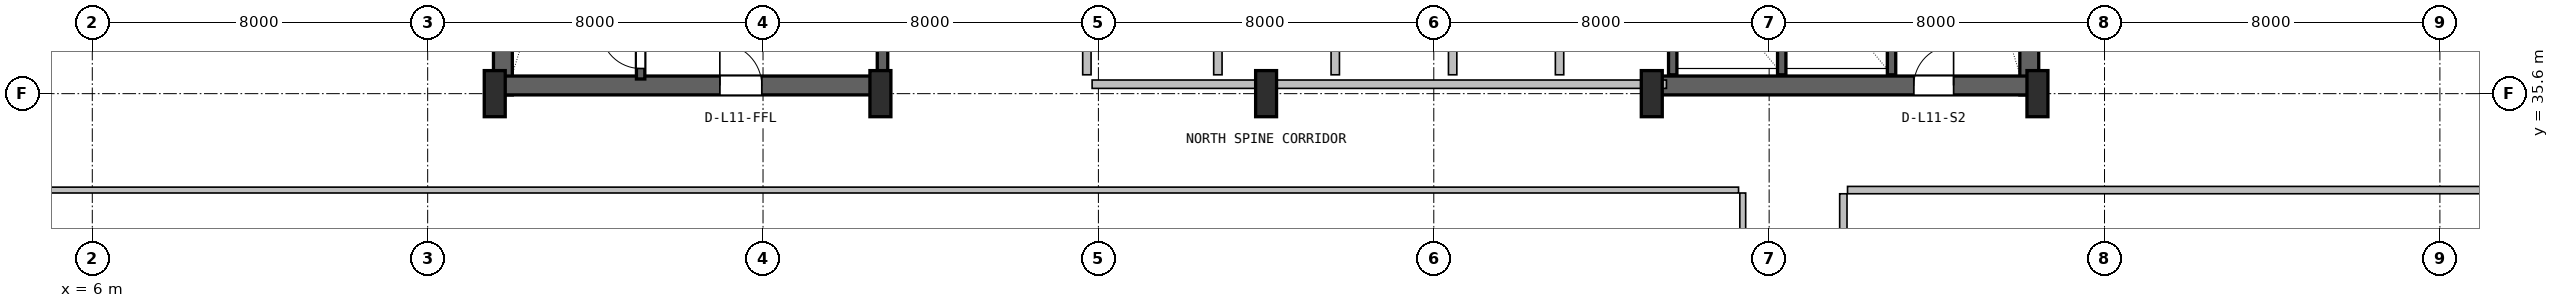
"""IFC4 building model, lengths in metres.
Left out: names, types, materials, properties, quantities, classifications, styles, units other than length and angle.
Written with IfcOpenShell. Run it as: python <this file> out.ifc"""

import sys

from ifc_helpers import new_model, si_unit, direction, frame, frame_2d, origin, origin_2d, place, context, subcontext, project, spatial, rectangle, i_section, extrude, source, transform, mapped, element, fill, save


model = new_model("IFC4")
c1 = context("Model", 3, precision=1e-05, world=origin(), true_north=direction((0.0, 1.0)))
c2 = subcontext(c1, "Body", "Model", "MODEL_VIEW")
j1 = project(units=[si_unit("LENGTHUNIT", "METRE"), si_unit("PLANEANGLEUNIT", "RADIAN")], contexts=[c1])
p1 = place(None, origin())
s1 = spatial("IfcSite", under=j1, at=p1, CompositionType="ELEMENT")
p2 = place(p1, origin())
s2 = spatial("IfcBuilding", under=s1, at=p2, CompositionType="ELEMENT")
p3 = place(p2, frame((0.0, 0.0, 51.0)))
s3 = spatial("IfcBuildingStorey", under=s2, at=p3, CompositionType="ELEMENT", Elevation=51.0)
for number, where, z_axis, x_axis in (
    (1, (15.795, 35.57, 0.0), (0.0, 0.0, 1.0), (0.0, 1.0, 0.0)),
    (2, (52.205, 35.57, 0.0), (0.0, 0.0, 1.0), (0.0, 1.0, 0.0)),
):
    element("IfcWall", number, at=place(p3, frame(where, z_axis=z_axis, x_axis=x_axis)), inside=s3, PredefinedType="SHEAR", context=c2, shape_type="SweptSolid", body=[
        extrude(rectangle(XDim=11.23, YDim=0.45, at=frame_2d((5.615, 0.0))), origin(), (0.0, 0.0, 1.0), 3.65),
    ])
p4 = place(p3, frame((15.57, 35.795, 0.0), z_axis=(0.0, 0.0, 1.0), x_axis=(1.0, 0.0, 0.0)))
e3 = element("IfcWall", 3, at=p4, inside=s3, PredefinedType="SHEAR", context=c2, shape_type="SweptSolid", body=[
    extrude(rectangle(XDim=9.23, YDim=0.45, at=frame_2d((4.615, 0.0))), origin(), (0.0, 0.0, 1.0), 3.65),
])
p5 = place(p4, frame((5.4, 0.0, 0.0)))
e4 = element("IfcOpeningElement", 4, at=p5, cuts=e3, PredefinedType="OPENING", context=c2, shape_type="SweptSolid", body=[
    extrude(rectangle(XDim=1.0, YDim=2.1, at=frame_2d((0.5, 1.05))), frame((0.0, 0.235, 0.0), z_axis=(0.0, -1.0, 0.0), x_axis=(1.0, 0.0, 0.0)), (0.0, 0.0, 1.0), 0.47),
])
p6 = place(p3, frame((43.2, 35.795, 0.0), z_axis=(0.0, 0.0, 1.0), x_axis=(1.0, 0.0, 0.0)))
e5 = element("IfcWall", 5, at=p6, inside=s3, PredefinedType="SHEAR", context=c2, shape_type="SweptSolid", body=[
    extrude(rectangle(XDim=9.23, YDim=0.45, at=frame_2d((4.615, 0.0))), origin(), (0.0, 0.0, 1.0), 3.65),
])
p7 = place(p6, frame((6.25, 0.0, 0.0)))
e6 = element("IfcOpeningElement", 6, at=p7, cuts=e5, PredefinedType="OPENING", context=c2, shape_type="SweptSolid", body=[
    extrude(rectangle(XDim=0.95, YDim=2.1, at=frame_2d((0.475, 1.05))), frame((0.0, 0.235, 0.0), z_axis=(0.0, -1.0, 0.0), x_axis=(1.0, 0.0, 0.0)), (0.0, 0.0, 1.0), 0.47),
])
m1 = source(origin(), c2, "Body", "SweptSolid", [
    extrude(i_section(OverallWidth=0.5, OverallDepth=1.1, WebThickness=0.018, FlangeThickness=0.032, FilletRadius=0.018, at=origin_2d()), origin(), (0.0, 0.0, 1.0), 3.9),
])
for number, where, z_axis, x_axis in (
    (7, (15.6, 35.6, 0.0), (0.0, 0.0, 1.0), (1.0, 0.0, 0.0)),
    (8, (24.8, 35.6, 0.0), (0.0, 0.0, 1.0), (1.0, 0.0, 0.0)),
    (9, (34.0, 35.6, 0.0), (0.0, 0.0, 1.0), (1.0, 0.0, 0.0)),
    (10, (43.2, 35.6, 0.0), (0.0, 0.0, 1.0), (1.0, 0.0, 0.0)),
    (11, (52.4, 35.6, 0.0), (0.0, 0.0, 1.0), (1.0, 0.0, 0.0)),
):
    element("IfcColumn", number, at=place(p3, frame(where, z_axis=z_axis, x_axis=x_axis)), inside=s3, PredefinedType="COLUMN", context=c2, shape_type="MappedRepresentation", body=[
        mapped(m1, transform((0.0, 0.0, 0.0), x_axis=(1.0, 0.0, 0.0), y_axis=(0.0, 1.0, 0.0), z_axis=(0.0, 0.0, 1.0), scale=1.0)),
    ])
p8 = place(p3, frame((19.08, 35.95, 0.0), z_axis=(0.0, 0.0, 1.0), x_axis=(0.0, 1.0, 0.0)))
e12 = element("IfcWall", 12, at=p8, inside=s3, PredefinedType="SHEAR", context=c2, shape_type="SweptSolid", body=[
    extrude(rectangle(XDim=9.65, YDim=0.2, at=frame_2d((4.825, 0.0))), origin(), (0.0, 0.0, 1.0), 3.65),
])
p9 = place(p8, frame((0.25, 0.0, 0.0)))
e13 = element("IfcOpeningElement", 13, at=p9, cuts=e12, PredefinedType="OPENING", context=c2, shape_type="SweptSolid", body=[
    extrude(rectangle(XDim=0.95, YDim=2.1, at=frame_2d((0.475, 1.05))), frame((0.0, 0.11, 0.0), z_axis=(0.0, -1.0, 0.0), x_axis=(1.0, 0.0, 0.0)), (0.0, 0.0, 1.0), 0.22),
])
p10 = place(p3, frame((24.85, 36.05, 0.0), z_axis=(0.0, 0.0, 1.0), x_axis=(0.0, 1.0, 0.0)))
e14 = element("IfcWall", 14, at=p10, inside=s3, PredefinedType="SHEAR", context=c2, shape_type="SweptSolid", body=[
    extrude(rectangle(XDim=10.45, YDim=0.25, at=frame_2d((5.225, 0.0))), origin(), (0.0, 0.0, 1.0), 3.65),
])
p11 = place(p3, frame((48.92, 36.05, 0.0), z_axis=(0.0, 0.0, 1.0), x_axis=(0.0, 1.0, 0.0)))
e15 = element("IfcWall", 15, at=p11, inside=s3, PredefinedType="SHEAR", context=c2, shape_type="SweptSolid", body=[
    extrude(rectangle(XDim=10.5, YDim=0.2, at=frame_2d((5.25, 0.0))), origin(), (0.0, 0.0, 1.0), 3.65),
])
for number, where, z_axis, x_axis in (
    (16, (43.7, 36.05, 0.0), (0.0, 0.0, 1.0), (0.0, 1.0, 0.0)),
    (17, (46.3, 36.05, 0.0), (0.0, 0.0, 1.0), (0.0, 1.0, 0.0)),
):
    element("IfcWall", number, at=place(p3, frame(where, z_axis=z_axis, x_axis=x_axis)), inside=s3, PredefinedType="SHEAR", context=c2, shape_type="SweptSolid", body=[
        extrude(rectangle(XDim=3.05, YDim=0.2, at=frame_2d((1.525, 0.0))), origin(), (0.0, 0.0, 1.0), 3.65),
    ])
p12 = place(p3, frame((29.85, 35.825, 0.0), z_axis=(0.0, 0.0, 1.0), x_axis=(1.0, 0.0, 0.0)))
e18 = element("IfcWall", 18, at=p12, inside=s3, PredefinedType="SOLIDWALL", context=c2, shape_type="SweptSolid", body=[
    extrude(rectangle(XDim=13.7, YDim=0.2, at=frame_2d((6.85, 0.0))), origin(), (0.0, 0.0, 1.0), 2.425),
])
for number, where, z_axis, x_axis in (
    (19, (32.85, 36.05, 0.0), (0.0, 0.0, 1.0), (0.0, 1.0, 0.0)),
    (20, (29.725, 36.05, 0.0), (0.0, 0.0, 1.0), (0.0, 1.0, 0.0)),
    (21, (35.65, 36.05, 0.0), (0.0, 0.0, 1.0), (0.0, 1.0, 0.0)),
    (22, (38.45, 36.05, 0.0), (0.0, 0.0, 1.0), (0.0, 1.0, 0.0)),
):
    element("IfcWall", number, at=place(p3, frame(where, z_axis=z_axis, x_axis=x_axis)), inside=s3, PredefinedType="PLUMBINGWALL", context=c2, shape_type="SweptSolid", body=[
        extrude(rectangle(XDim=3.1, YDim=0.2, at=frame_2d((1.55, 0.0))), origin(), (0.0, 0.0, 1.0), 3.63),
    ])
p13 = place(p3, frame((41.0, 36.05, 0.0), z_axis=(0.0, 0.0, 1.0), x_axis=(0.0, 1.0, 0.0)))
e23 = element("IfcWall", 23, at=p13, inside=s3, PredefinedType="SOLIDWALL", context=c2, shape_type="SweptSolid", body=[
    extrude(rectangle(XDim=3.1, YDim=0.2, at=frame_2d((1.55, 0.0))), origin(), (0.0, 0.0, 1.0), 3.63),
])
p14 = place(p3, frame((45.37, 23.6, 0.0), z_axis=(0.0, 0.0, 1.0), x_axis=(0.0, 1.0, 0.0)))
e24 = element("IfcWall", 24, at=p14, inside=s3, PredefinedType="PARTITIONING", context=c2, shape_type="SweptSolid", body=[
    extrude(rectangle(XDim=9.63, YDim=0.14, at=frame_2d((4.815, 0.0))), origin(), (0.0, 0.0, 1.0), 3.378),
])
p15 = place(p3, frame((2.18, 33.3, 0.0), z_axis=(0.0, 0.0, 1.0), x_axis=(1.0, 0.0, 0.0)))
e25 = element("IfcWall", 25, at=p15, inside=s3, PredefinedType="PARTITIONING", context=c2, shape_type="SweptSolid", body=[
    extrude(rectangle(XDim=43.09, YDim=0.14, at=frame_2d((21.545, 0.0))), origin(), (0.0, 0.0, 1.0), 2.852),
])
p16 = place(p3, frame((47.77, 2.55, 0.0), z_axis=(0.0, 0.0, 1.0), x_axis=(0.0, 1.0, 0.0)))
e26 = element("IfcWall", 26, at=p16, inside=s3, PredefinedType="PARTITIONING", context=c2, shape_type="SweptSolid", body=[
    extrude(rectangle(XDim=30.662, YDim=0.175, at=frame_2d((15.331, 0.0))), origin(), (0.0, 0.0, 1.0), 3.322),
])
p17 = place(p16, frame((5.515, 0.0, 0.0)))
e27 = element("IfcOpeningElement", 27, at=p17, cuts=e26, PredefinedType="OPENING", context=c2, shape_type="SweptSolid", body=[
    extrude(rectangle(XDim=1.05, YDim=2.1, at=frame_2d((0.525, 1.05))), frame((0.0, 0.098, 0.0), z_axis=(0.0, -1.0, 0.0), x_axis=(1.0, 0.0, 0.0)), (0.0, 0.0, 1.0), 0.195),
])
p18 = place(p16, frame((20.94, 0.0, 0.0)))
e28 = element("IfcOpeningElement", 28, at=p18, cuts=e26, PredefinedType="OPENING", context=c2, shape_type="SweptSolid", body=[
    extrude(rectangle(XDim=1.05, YDim=2.1, at=frame_2d((0.525, 1.05))), frame((0.0, 0.098, 0.0), z_axis=(0.0, -1.0, 0.0), x_axis=(1.0, 0.0, 0.0)), (0.0, 0.0, 1.0), 0.195),
])
p19 = place(p3, frame((47.87, 33.3, 0.0), z_axis=(0.0, 0.0, 1.0), x_axis=(1.0, 0.0, 0.0)))
e29 = element("IfcWall", 29, at=p19, inside=s3, PredefinedType="PARTITIONING", context=c2, shape_type="SweptSolid", body=[
    extrude(rectangle(XDim=17.95, YDim=0.175, at=frame_2d((8.975, 0.0))), origin(), (0.0, 0.0, 1.0), 3.208),
])
m2 = source(origin(), c2, "Body", "SweptSolid", [
    extrude(rectangle(XDim=0.95, YDim=2.1, at=frame_2d((0.475, 1.05))), frame((0.0, 0.025, 0.0), z_axis=(0.0, -1.0, 0.0), x_axis=(1.0, 0.0, 0.0)), (0.0, 0.0, 1.0), 0.05),
])
p20 = place(p9, origin())
e30 = element("IfcDoor", 30, at=p20, inside=s3, OperationType="SINGLE_SWING_RIGHT", PredefinedType="DOOR", context=c2, shape_type="MappedRepresentation", body=[
    mapped(m2, transform((0.0, 0.0, 0.0), x_axis=(1.0, 0.0, 0.0), y_axis=(0.0, 1.0, 0.0), z_axis=(0.0, 0.0, 1.0), scale=1.0)),
])
fill(e13, e30)
m3 = source(origin(), c2, "Body", "SweptSolid", [
    extrude(rectangle(XDim=1.0, YDim=2.1, at=frame_2d((0.5, 1.05))), frame((0.0, 0.025, 0.0), z_axis=(0.0, -1.0, 0.0), x_axis=(1.0, 0.0, 0.0)), (0.0, 0.0, 1.0), 0.05),
])
p21 = place(p5, origin())
e31 = element("IfcDoor", 31, at=p21, inside=s3, OperationType="SINGLE_SWING_LEFT", PredefinedType="DOOR", context=c2, shape_type="MappedRepresentation", body=[
    mapped(m3, transform((0.0, 0.0, 0.0), x_axis=(1.0, 0.0, 0.0), y_axis=(0.0, 1.0, 0.0), z_axis=(0.0, 0.0, 1.0), scale=1.0)),
])
fill(e4, e31)
p22 = place(p7, origin())
e32 = element("IfcDoor", 32, at=p22, inside=s3, OperationType="SINGLE_SWING_RIGHT", PredefinedType="DOOR", context=c2, shape_type="MappedRepresentation", body=[
    mapped(m2, transform((0.0, 0.0, 0.0), x_axis=(1.0, 0.0, 0.0), y_axis=(0.0, 1.0, 0.0), z_axis=(0.0, 0.0, 1.0), scale=1.0)),
])
fill(e6, e32)
save(model, sys.argv[1])
